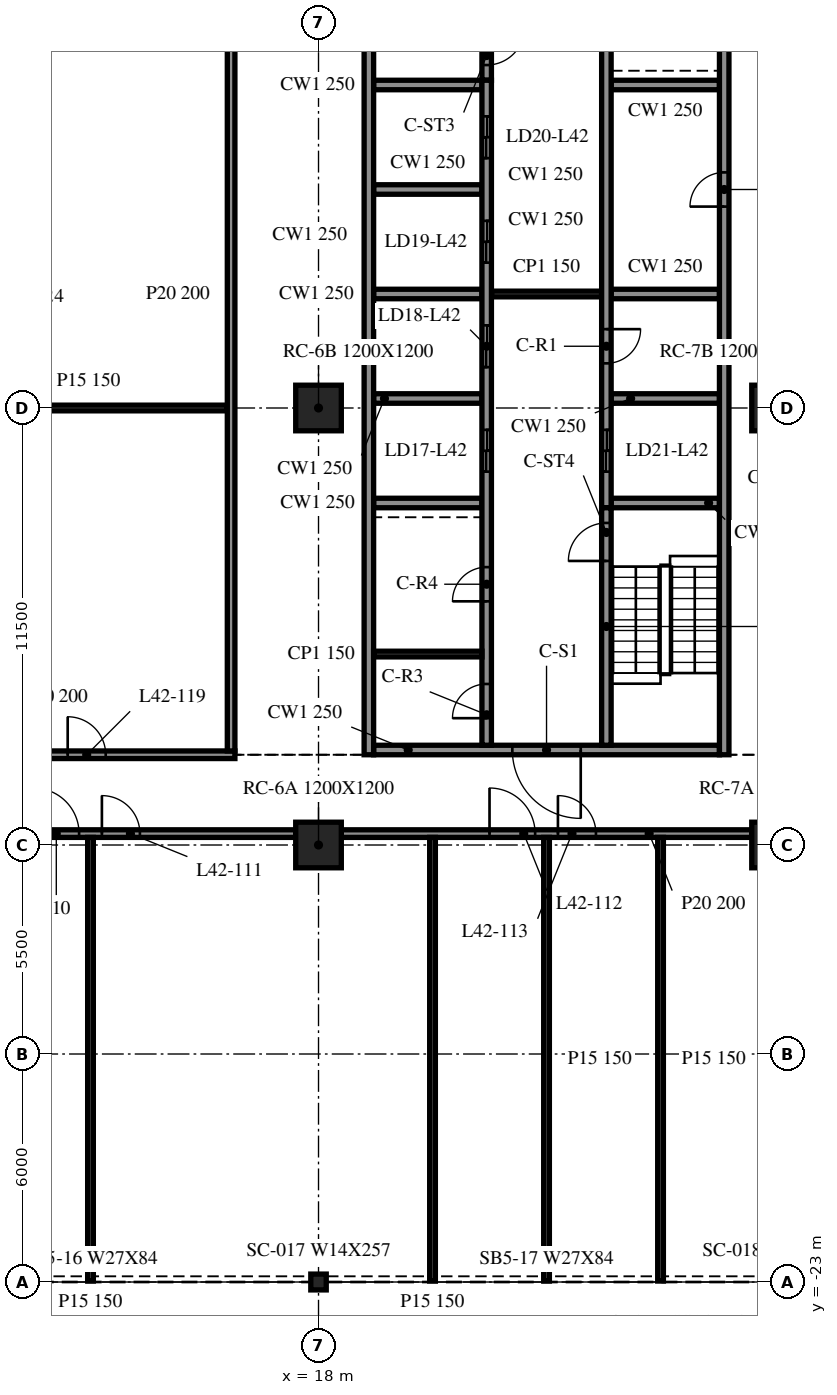
"""IFC4 building model, lengths in metres.
Left out: names, types, materials, properties, quantities, classifications, styles, units other than length and angle.
Written with IfcOpenShell. Run it as: python <this file> out.ifc"""

import sys

from ifc_helpers import new_model, si_unit, direction, frame, frame_2d, origin, origin_2d, place, context, subcontext, project, spatial, rectangle, i_section, extrude, element, fill, save


model = new_model("IFC4")
c1 = context("Model", 3, precision=1e-05, world=origin(), true_north=direction((0.0, 1.0)))
c2 = subcontext(c1, "Body", "Model", "MODEL_VIEW")
j1 = project(units=[si_unit("LENGTHUNIT", "METRE"), si_unit("PLANEANGLEUNIT", "RADIAN")], contexts=[c1])
p1 = place(None, origin())
s1 = spatial("IfcSite", under=j1, at=p1, CompositionType="ELEMENT")
p2 = place(p1, origin())
s2 = spatial("IfcBuilding", under=s1, at=p2, CompositionType="ELEMENT")
p3 = place(p2, frame((0.0, 0.0, 178.2)))
s3 = spatial("IfcBuildingStorey", under=s2, at=p3, CompositionType="ELEMENT", Elevation=178.2)
for number, where, z_axis, x_axis in (
    (1, (18.0, -11.5, -0.34), (0.0, 0.0, 1.0), (1.0, 0.0, 0.0)),
    (2, (18.0, 0.0, -0.34), (0.0, 0.0, 1.0), (1.0, 0.0, 0.0)),
    (3, (30.0, -11.5, -0.34), (0.0, 0.0, 1.0), (1.0, 0.0, 0.0)),
    (4, (30.0, 0.0, -0.34), (0.0, 0.0, 1.0), (1.0, 0.0, 0.0)),
):
    element("IfcColumn", number, at=place(p3, frame(where, z_axis=z_axis, x_axis=x_axis)), inside=s3, PredefinedType="COLUMN", context=c2, shape_type="SweptSolid", body=[
        extrude(rectangle(XDim=1.2, YDim=1.2, at=origin_2d()), origin(), (0.0, 0.0, 1.0), 3.8),
    ])
p4 = place(p3, frame((18.0, -23.0, -0.34), z_axis=(0.0, 0.0, 1.0), x_axis=(1.0, 0.0, 0.0)))
e5 = element("IfcColumn", 5, at=p4, inside=s3, PredefinedType="COLUMN", context=c2, shape_type="SweptSolid", body=[
    extrude(i_section(OverallWidth=0.406, OverallDepth=0.417, WebThickness=0.03, FlangeThickness=0.048, at=origin_2d()), origin(), (0.0, 0.0, 1.0), 3.8),
])
p5 = place(p3, frame((19.325, 15.125, 0.0), z_axis=(0.0, 0.0, 1.0), x_axis=(0.0, -1.0, 0.0)))
e6 = element("IfcWall", 6, at=p5, inside=s3, PredefinedType="SOLIDWALL", context=c2, shape_type="SweptSolid", body=[
    extrude(rectangle(XDim=24.25, YDim=0.25, at=frame_2d((12.125, 0.0))), origin(), (0.0, 0.0, 1.0), 3.46),
])
p6 = place(p3, frame((28.675, -9.125, 0.0), z_axis=(0.0, 0.0, 1.0), x_axis=(0.0, 1.0, 0.0)))
e7 = element("IfcWall", 7, at=p6, inside=s3, PredefinedType="SOLIDWALL", context=c2, shape_type="SweptSolid", body=[
    extrude(rectangle(XDim=24.25, YDim=0.25, at=frame_2d((12.125, 0.0))), origin(), (0.0, 0.0, 1.0), 3.46),
])
p7 = place(p6, frame((14.425, 0.0, 0.0)))
e8 = element("IfcOpeningElement", 8, at=p7, cuts=e7, PredefinedType="OPENING", context=c2, shape_type="SweptSolid", body=[
    extrude(rectangle(XDim=0.9, YDim=2.1, at=frame_2d((0.45, 1.05))), frame((0.0, 0.135, 0.0), z_axis=(0.0, -1.0, 0.0), x_axis=(1.0, 0.0, 0.0)), (0.0, 0.0, 1.0), 0.27),
])
p8 = place(p6, frame((19.012, 0.0, 0.0)))
e9 = element("IfcOpeningElement", 9, at=p8, cuts=e7, PredefinedType="OPENING", context=c2, shape_type="SweptSolid", body=[
    extrude(rectangle(XDim=0.9, YDim=2.1, at=frame_2d((0.45, 1.05))), frame((0.0, 0.135, 0.0), z_axis=(0.0, -1.0, 0.0), x_axis=(1.0, 0.0, 0.0)), (0.0, 0.0, 1.0), 0.27),
])
p9 = place(p6, frame((22.087, 0.0, 0.0)))
e10 = element("IfcOpeningElement", 10, at=p9, cuts=e7, PredefinedType="OPENING", context=c2, shape_type="SweptSolid", body=[
    extrude(rectangle(XDim=0.9, YDim=2.1, at=frame_2d((0.45, 1.05))), frame((0.0, 0.135, 0.0), z_axis=(0.0, -1.0, 0.0), x_axis=(1.0, 0.0, 0.0)), (0.0, 0.0, 1.0), 0.27),
])
p10 = place(p3, frame((28.55, -9.0, 0.0), z_axis=(0.0, 0.0, 1.0), x_axis=(-1.0, 0.0, 0.0)))
e11 = element("IfcWall", 11, at=p10, inside=s3, PredefinedType="SOLIDWALL", context=c2, shape_type="SweptSolid", body=[
    extrude(rectangle(XDim=9.1, YDim=0.25, at=frame_2d((4.55, 0.0))), origin(), (0.0, 0.0, 1.0), 3.46),
])
p11 = place(p10, frame((3.65, 0.0, 0.0)))
e12 = element("IfcOpeningElement", 12, at=p11, cuts=e11, PredefinedType="OPENING", context=c2, shape_type="SweptSolid", body=[
    extrude(rectangle(XDim=1.8, YDim=2.1, at=frame_2d((0.9, 1.05))), frame((0.0, 0.135, 0.0), z_axis=(0.0, -1.0, 0.0), x_axis=(1.0, 0.0, 0.0)), (0.0, 0.0, 1.0), 0.27),
])
p12 = place(p3, frame((22.425, -8.875, 0.0), z_axis=(0.0, 0.0, 1.0), x_axis=(0.0, 1.0, 0.0)))
e13 = element("IfcWall", 13, at=p12, inside=s3, PredefinedType="SOLIDWALL", context=c2, shape_type="SweptSolid", body=[
    extrude(rectangle(XDim=17.5, YDim=0.25, at=frame_2d((8.75, 0.0))), origin(), (0.0, 0.0, 1.0), 3.46),
])
p13 = place(p12, frame((7.2, 0.0, 0.0)))
e14 = element("IfcOpeningElement", 14, at=p13, cuts=e13, PredefinedType="OPENING", context=c2, shape_type="SweptSolid", body=[
    extrude(rectangle(XDim=1.1, YDim=2.1, at=frame_2d((0.55, 1.05))), frame((0.0, 0.135, 0.0), z_axis=(0.0, -1.0, 0.0), x_axis=(1.0, 0.0, 0.0)), (0.0, 0.0, 1.0), 0.27),
])
p14 = place(p12, frame((9.95, 0.0, 0.0)))
e15 = element("IfcOpeningElement", 15, at=p14, cuts=e13, PredefinedType="OPENING", context=c2, shape_type="SweptSolid", body=[
    extrude(rectangle(XDim=1.1, YDim=2.1, at=frame_2d((0.55, 1.05))), frame((0.0, 0.135, 0.0), z_axis=(0.0, -1.0, 0.0), x_axis=(1.0, 0.0, 0.0)), (0.0, 0.0, 1.0), 0.27),
])
p15 = place(p12, frame((12.7, 0.0, 0.0)))
e16 = element("IfcOpeningElement", 16, at=p15, cuts=e13, PredefinedType="OPENING", context=c2, shape_type="SweptSolid", body=[
    extrude(rectangle(XDim=1.1, YDim=2.1, at=frame_2d((0.55, 1.05))), frame((0.0, 0.135, 0.0), z_axis=(0.0, -1.0, 0.0), x_axis=(1.0, 0.0, 0.0)), (0.0, 0.0, 1.0), 0.27),
])
p16 = place(p12, frame((15.45, 0.0, 0.0)))
e17 = element("IfcOpeningElement", 17, at=p16, cuts=e13, PredefinedType="OPENING", context=c2, shape_type="SweptSolid", body=[
    extrude(rectangle(XDim=1.1, YDim=2.1, at=frame_2d((0.55, 1.05))), frame((0.0, 0.135, 0.0), z_axis=(0.0, -1.0, 0.0), x_axis=(1.0, 0.0, 0.0)), (0.0, 0.0, 1.0), 0.27),
])
p17 = place(p12, frame((0.712, 0.0, 0.0)))
e18 = element("IfcOpeningElement", 18, at=p17, cuts=e13, PredefinedType="OPENING", context=c2, shape_type="SweptSolid", body=[
    extrude(rectangle(XDim=0.9, YDim=2.1, at=frame_2d((0.45, 1.05))), frame((0.0, 0.135, 0.0), z_axis=(0.0, -1.0, 0.0), x_axis=(1.0, 0.0, 0.0)), (0.0, 0.0, 1.0), 0.27),
])
p18 = place(p12, frame((3.788, 0.0, 0.0)))
e19 = element("IfcOpeningElement", 19, at=p18, cuts=e13, PredefinedType="OPENING", context=c2, shape_type="SweptSolid", body=[
    extrude(rectangle(XDim=0.9, YDim=2.1, at=frame_2d((0.45, 1.05))), frame((0.0, 0.135, 0.0), z_axis=(0.0, -1.0, 0.0), x_axis=(1.0, 0.0, 0.0)), (0.0, 0.0, 1.0), 0.27),
])
p19 = place(p3, frame((22.425, 14.875, 0.0), z_axis=(0.0, 0.0, 1.0), x_axis=(0.0, -1.0, 0.0)))
e20 = element("IfcWall", 20, at=p19, inside=s3, PredefinedType="SOLIDWALL", context=c2, shape_type="SweptSolid", body=[
    extrude(rectangle(XDim=6.25, YDim=0.25, at=frame_2d((3.125, 0.0))), origin(), (0.0, 0.0, 1.0), 3.46),
])
p20 = place(p19, frame((4.85, 0.0, 0.0)))
e21 = element("IfcOpeningElement", 21, at=p20, cuts=e20, PredefinedType="OPENING", context=c2, shape_type="SweptSolid", body=[
    extrude(rectangle(XDim=1.0, YDim=2.1, at=frame_2d((0.5, 1.05))), frame((0.0, 0.135, 0.0), z_axis=(0.0, -1.0, 0.0), x_axis=(1.0, 0.0, 0.0)), (0.0, 0.0, 1.0), 0.27),
])
p21 = place(p3, frame((25.575, -8.875, 0.0), z_axis=(0.0, 0.0, 1.0), x_axis=(0.0, 1.0, 0.0)))
e22 = element("IfcWall", 22, at=p21, inside=s3, PredefinedType="SOLIDWALL", context=c2, shape_type="SweptSolid", body=[
    extrude(rectangle(XDim=6.25, YDim=0.25, at=frame_2d((3.125, 0.0))), origin(), (0.0, 0.0, 1.0), 3.46),
])
p22 = place(p21, frame((4.85, 0.0, 0.0)))
e23 = element("IfcOpeningElement", 23, at=p22, cuts=e22, PredefinedType="OPENING", context=c2, shape_type="SweptSolid", body=[
    extrude(rectangle(XDim=1.0, YDim=2.1, at=frame_2d((0.5, 1.05))), frame((0.0, 0.135, 0.0), z_axis=(0.0, -1.0, 0.0), x_axis=(1.0, 0.0, 0.0)), (0.0, 0.0, 1.0), 0.27),
])
p23 = place(p3, frame((25.575, 14.875, 0.0), z_axis=(0.0, 0.0, 1.0), x_axis=(0.0, -1.0, 0.0)))
e24 = element("IfcWall", 24, at=p23, inside=s3, PredefinedType="SOLIDWALL", context=c2, shape_type="SweptSolid", body=[
    extrude(rectangle(XDim=17.5, YDim=0.25, at=frame_2d((8.75, 0.0))), origin(), (0.0, 0.0, 1.0), 3.46),
])
p24 = place(p23, frame((15.45, 0.0, 0.0)))
e25 = element("IfcOpeningElement", 25, at=p24, cuts=e24, PredefinedType="OPENING", context=c2, shape_type="SweptSolid", body=[
    extrude(rectangle(XDim=1.1, YDim=2.1, at=frame_2d((0.55, 1.05))), frame((0.0, 0.135, 0.0), z_axis=(0.0, -1.0, 0.0), x_axis=(1.0, 0.0, 0.0)), (0.0, 0.0, 1.0), 0.27),
])
p25 = place(p23, frame((12.8, 0.0, 0.0)))
e26 = element("IfcOpeningElement", 26, at=p25, cuts=e24, PredefinedType="OPENING", context=c2, shape_type="SweptSolid", body=[
    extrude(rectangle(XDim=0.9, YDim=2.1, at=frame_2d((0.45, 1.05))), frame((0.0, 0.135, 0.0), z_axis=(0.0, -1.0, 0.0), x_axis=(1.0, 0.0, 0.0)), (0.0, 0.0, 1.0), 0.27),
])
for number, where, z_axis, x_axis in (
    (27, (19.45, -2.5, 0.0), (0.0, 0.0, 1.0), (1.0, 0.0, 0.0)),
    (28, (19.45, 0.25, 0.0), (0.0, 0.0, 1.0), (1.0, 0.0, 0.0)),
    (29, (19.45, 3.0, 0.0), (0.0, 0.0, 1.0), (1.0, 0.0, 0.0)),
    (30, (19.45, 5.75, 0.0), (0.0, 0.0, 1.0), (1.0, 0.0, 0.0)),
    (31, (19.45, 8.5, 0.0), (0.0, 0.0, 1.0), (1.0, 0.0, 0.0)),
    (32, (25.7, -2.5, 0.0), (0.0, 0.0, 1.0), (1.0, 0.0, 0.0)),
    (33, (25.7, 0.25, 0.0), (0.0, 0.0, 1.0), (1.0, 0.0, 0.0)),
    (34, (25.7, 3.0, 0.0), (0.0, 0.0, 1.0), (1.0, 0.0, 0.0)),
    (35, (25.7, 8.5, 0.0), (0.0, 0.0, 1.0), (1.0, 0.0, 0.0)),
):
    element("IfcWall", number, at=place(p3, frame(where, z_axis=z_axis, x_axis=x_axis)), inside=s3, PredefinedType="SOLIDWALL", context=c2, shape_type="SweptSolid", body=[
        extrude(rectangle(XDim=2.85, YDim=0.25, at=frame_2d((1.425, 0.0))), origin(), (0.0, 0.0, 1.0), 3.46),
    ])
p26 = place(p3, frame((22.55, 3.0, 0.0), z_axis=(0.0, 0.0, 1.0), x_axis=(1.0, 0.0, 0.0)))
e36 = element("IfcWall", 36, at=p26, inside=s3, PredefinedType="PARTITIONING", context=c2, shape_type="SweptSolid", body=[
    extrude(rectangle(XDim=2.9, YDim=0.15, at=frame_2d((1.45, 0.0))), origin(), (0.0, 0.0, 1.0), 3.46),
])
p27 = place(p3, frame((19.45, -6.475, 0.0), z_axis=(0.0, 0.0, 1.0), x_axis=(1.0, 0.0, 0.0)))
e37 = element("IfcWall", 37, at=p27, inside=s3, PredefinedType="PARTITIONING", context=c2, shape_type="SweptSolid", body=[
    extrude(rectangle(XDim=2.85, YDim=0.15, at=frame_2d((1.425, 0.0))), origin(), (0.0, 0.0, 1.0), 3.46),
])
p28 = place(p3, frame((6.6, -11.2, 0.0), z_axis=(0.0, 0.0, 1.0), x_axis=(1.0, 0.0, 0.0)))
e38 = element("IfcWall", 38, at=p28, inside=s3, PredefinedType="PARTITIONING", context=c2, shape_type="SweptSolid", body=[
    extrude(rectangle(XDim=10.8, YDim=0.2, at=frame_2d((5.4, 0.0))), origin(), (0.0, 0.0, 1.0), 3.46),
])
p29 = place(p28, frame((3.9, 0.0, 0.0)))
e39 = element("IfcOpeningElement", 39, at=p29, cuts=e38, PredefinedType="OPENING", context=c2, shape_type="SweptSolid", body=[
    extrude(rectangle(XDim=1.2, YDim=2.1, at=frame_2d((0.6, 1.05))), frame((0.0, 0.11, 0.0), z_axis=(0.0, -1.0, 0.0), x_axis=(1.0, 0.0, 0.0)), (0.0, 0.0, 1.0), 0.22),
])
p30 = place(p28, frame((5.7, 0.0, 0.0)))
e40 = element("IfcOpeningElement", 40, at=p30, cuts=e38, PredefinedType="OPENING", context=c2, shape_type="SweptSolid", body=[
    extrude(rectangle(XDim=1.0, YDim=2.1, at=frame_2d((0.5, 1.05))), frame((0.0, 0.11, 0.0), z_axis=(0.0, -1.0, 0.0), x_axis=(1.0, 0.0, 0.0)), (0.0, 0.0, 1.0), 0.22),
])
p31 = place(p3, frame((18.6, -11.2, 0.0), z_axis=(0.0, 0.0, 1.0), x_axis=(1.0, 0.0, 0.0)))
e41 = element("IfcWall", 41, at=p31, inside=s3, PredefinedType="PARTITIONING", context=c2, shape_type="SweptSolid", body=[
    extrude(rectangle(XDim=10.8, YDim=0.2, at=frame_2d((5.4, 0.0))), origin(), (0.0, 0.0, 1.0), 3.46),
])
p32 = place(p31, frame((3.9, 0.0, 0.0)))
e42 = element("IfcOpeningElement", 42, at=p32, cuts=e41, PredefinedType="OPENING", context=c2, shape_type="SweptSolid", body=[
    extrude(rectangle(XDim=1.2, YDim=2.1, at=frame_2d((0.6, 1.05))), frame((0.0, 0.11, 0.0), z_axis=(0.0, -1.0, 0.0), x_axis=(1.0, 0.0, 0.0)), (0.0, 0.0, 1.0), 0.22),
])
p33 = place(p31, frame((5.7, 0.0, 0.0)))
e43 = element("IfcOpeningElement", 43, at=p33, cuts=e41, PredefinedType="OPENING", context=c2, shape_type="SweptSolid", body=[
    extrude(rectangle(XDim=1.0, YDim=2.1, at=frame_2d((0.5, 1.05))), frame((0.0, 0.11, 0.0), z_axis=(0.0, -1.0, 0.0), x_axis=(1.0, 0.0, 0.0)), (0.0, 0.0, 1.0), 0.22),
])
p34 = place(p3, frame((8.1, -9.125, 0.0), z_axis=(0.0, 0.0, 1.0), x_axis=(1.0, 0.0, 0.0)))
e44 = element("IfcWall", 44, at=p34, inside=s3, PredefinedType="PARTITIONING", context=c2, shape_type="SweptSolid", body=[
    extrude(rectangle(XDim=7.7, YDim=0.2, at=frame_2d((3.85, 0.0))), origin(), (0.0, 0.0, 1.0), 3.46),
])
p35 = place(p34, frame((3.3, 0.0, 0.0)))
e45 = element("IfcOpeningElement", 45, at=p35, cuts=e44, PredefinedType="OPENING", context=c2, shape_type="SweptSolid", body=[
    extrude(rectangle(XDim=1.0, YDim=2.1, at=frame_2d((0.5, 1.05))), frame((0.0, 0.11, 0.0), z_axis=(0.0, -1.0, 0.0), x_axis=(1.0, 0.0, 0.0)), (0.0, 0.0, 1.0), 0.22),
])
p36 = place(p3, frame((8.3, 0.0, 0.0), z_axis=(0.0, 0.0, 1.0), x_axis=(1.0, 0.0, 0.0)))
e46 = element("IfcWall", 46, at=p36, inside=s3, PredefinedType="PARTITIONING", context=c2, shape_type="SweptSolid", body=[
    extrude(rectangle(XDim=7.3, YDim=0.15, at=frame_2d((3.65, 0.0))), origin(), (0.0, 0.0, 1.0), 3.46),
])
p37 = place(p3, frame((12.0, -22.975, 0.0), z_axis=(0.0, 0.0, 1.0), x_axis=(0.0, 1.0, 0.0)))
e47 = element("IfcWall", 47, at=p37, inside=s3, PredefinedType="PARTITIONING", context=c2, shape_type="SweptSolid", body=[
    extrude(rectangle(XDim=11.675, YDim=0.15, at=frame_2d((5.837, 0.0))), origin(), (0.0, 0.0, 1.0), 3.46),
])
p38 = place(p3, frame((15.7, -9.025, 0.0), z_axis=(0.0, 0.0, 1.0), x_axis=(0.0, 1.0, 0.0)))
e48 = element("IfcWall", 48, at=p38, inside=s3, PredefinedType="PARTITIONING", context=c2, shape_type="SweptSolid", body=[
    extrude(rectangle(XDim=24.05, YDim=0.2, at=frame_2d((12.025, 0.0))), origin(), (0.0, 0.0, 1.0), 3.46),
])
for number, where, z_axis, x_axis in (
    (49, (21.0, -22.975, 0.0), (0.0, 0.0, 1.0), (0.0, 1.0, 0.0)),
    (50, (24.0, -22.975, 0.0), (0.0, 0.0, 1.0), (0.0, 1.0, 0.0)),
    (51, (27.0, -22.975, 0.0), (0.0, 0.0, 1.0), (0.0, 1.0, 0.0)),
):
    element("IfcWall", number, at=place(p3, frame(where, z_axis=z_axis, x_axis=x_axis)), inside=s3, PredefinedType="PARTITIONING", context=c2, shape_type="SweptSolid", body=[
        extrude(rectangle(XDim=11.675, YDim=0.15, at=frame_2d((5.837, 0.0))), origin(), (0.0, 0.0, 1.0), 3.46),
    ])
p39 = place(p11, origin())
e52 = element("IfcDoor", 52, at=p39, inside=s3, OperationType="DOUBLE_DOOR_SINGLE_SWING", PredefinedType="DOOR", context=c2, shape_type="SweptSolid", body=[
    extrude(rectangle(XDim=1.8, YDim=2.1, at=frame_2d((0.9, 1.05))), frame((0.0, 0.025, 0.0), z_axis=(0.0, -1.0, 0.0), x_axis=(1.0, 0.0, 0.0)), (0.0, 0.0, 1.0), 0.05),
])
fill(e12, e52)
p40 = place(p24, origin())
e53 = element("IfcDoor", 53, at=p40, inside=s3, OperationType="DOUBLE_DOOR_SLIDING", PredefinedType="DOOR", context=c2, shape_type="SweptSolid", body=[
    extrude(rectangle(XDim=1.1, YDim=2.1, at=frame_2d((0.55, 1.05))), frame((0.0, 0.025, 0.0), z_axis=(0.0, -1.0, 0.0), x_axis=(1.0, 0.0, 0.0)), (0.0, 0.0, 1.0), 0.05),
])
fill(e25, e53)
p41 = place(p13, origin())
e54 = element("IfcDoor", 54, at=p41, inside=s3, OperationType="DOUBLE_DOOR_SLIDING", PredefinedType="DOOR", context=c2, shape_type="SweptSolid", body=[
    extrude(rectangle(XDim=1.1, YDim=2.1, at=frame_2d((0.55, 1.05))), frame((0.0, 0.025, 0.0), z_axis=(0.0, -1.0, 0.0), x_axis=(1.0, 0.0, 0.0)), (0.0, 0.0, 1.0), 0.05),
])
fill(e14, e54)
p42 = place(p14, origin())
e55 = element("IfcDoor", 55, at=p42, inside=s3, OperationType="DOUBLE_DOOR_SLIDING", PredefinedType="DOOR", context=c2, shape_type="SweptSolid", body=[
    extrude(rectangle(XDim=1.1, YDim=2.1, at=frame_2d((0.55, 1.05))), frame((0.0, 0.025, 0.0), z_axis=(0.0, -1.0, 0.0), x_axis=(1.0, 0.0, 0.0)), (0.0, 0.0, 1.0), 0.05),
])
fill(e15, e55)
p43 = place(p15, origin())
e56 = element("IfcDoor", 56, at=p43, inside=s3, OperationType="DOUBLE_DOOR_SLIDING", PredefinedType="DOOR", context=c2, shape_type="SweptSolid", body=[
    extrude(rectangle(XDim=1.1, YDim=2.1, at=frame_2d((0.55, 1.05))), frame((0.0, 0.025, 0.0), z_axis=(0.0, -1.0, 0.0), x_axis=(1.0, 0.0, 0.0)), (0.0, 0.0, 1.0), 0.05),
])
fill(e16, e56)
p44 = place(p16, origin())
e57 = element("IfcDoor", 57, at=p44, inside=s3, OperationType="DOUBLE_DOOR_SLIDING", PredefinedType="DOOR", context=c2, shape_type="SweptSolid", body=[
    extrude(rectangle(XDim=1.1, YDim=2.1, at=frame_2d((0.55, 1.05))), frame((0.0, 0.025, 0.0), z_axis=(0.0, -1.0, 0.0), x_axis=(1.0, 0.0, 0.0)), (0.0, 0.0, 1.0), 0.05),
])
fill(e17, e57)
p45 = place(p25, origin())
e58 = element("IfcDoor", 58, at=p45, inside=s3, OperationType="SINGLE_SWING_LEFT", PredefinedType="DOOR", context=c2, shape_type="SweptSolid", body=[
    extrude(rectangle(XDim=0.9, YDim=2.1, at=frame_2d((0.45, 1.05))), frame((0.0, 0.025, 0.0), z_axis=(0.0, -1.0, 0.0), x_axis=(1.0, 0.0, 0.0)), (0.0, 0.0, 1.0), 0.05),
])
fill(e26, e58)
p46 = place(p7, origin())
e59 = element("IfcDoor", 59, at=p46, inside=s3, OperationType="SINGLE_SWING_RIGHT", PredefinedType="DOOR", context=c2, shape_type="SweptSolid", body=[
    extrude(rectangle(XDim=0.9, YDim=2.1, at=frame_2d((0.45, 1.05))), frame((0.0, 0.025, 0.0), z_axis=(0.0, -1.0, 0.0), x_axis=(1.0, 0.0, 0.0)), (0.0, 0.0, 1.0), 0.05),
])
fill(e8, e59)
p47 = place(p17, origin())
e60 = element("IfcDoor", 60, at=p47, inside=s3, OperationType="SINGLE_SWING_LEFT", PredefinedType="DOOR", context=c2, shape_type="SweptSolid", body=[
    extrude(rectangle(XDim=0.9, YDim=2.1, at=frame_2d((0.45, 1.05))), frame((0.0, 0.025, 0.0), z_axis=(0.0, -1.0, 0.0), x_axis=(1.0, 0.0, 0.0)), (0.0, 0.0, 1.0), 0.05),
])
fill(e18, e60)
p48 = place(p18, origin())
e61 = element("IfcDoor", 61, at=p48, inside=s3, OperationType="SINGLE_SWING_RIGHT", PredefinedType="DOOR", context=c2, shape_type="SweptSolid", body=[
    extrude(rectangle(XDim=0.9, YDim=2.1, at=frame_2d((0.45, 1.05))), frame((0.0, 0.025, 0.0), z_axis=(0.0, -1.0, 0.0), x_axis=(1.0, 0.0, 0.0)), (0.0, 0.0, 1.0), 0.05),
])
fill(e19, e61)
p49 = place(p20, origin())
e62 = element("IfcDoor", 62, at=p49, inside=s3, OperationType="SINGLE_SWING_LEFT", PredefinedType="DOOR", context=c2, shape_type="SweptSolid", body=[
    extrude(rectangle(XDim=1.0, YDim=2.1, at=frame_2d((0.5, 1.05))), frame((0.0, 0.025, 0.0), z_axis=(0.0, -1.0, 0.0), x_axis=(1.0, 0.0, 0.0)), (0.0, 0.0, 1.0), 0.05),
])
fill(e21, e62)
p50 = place(p22, origin())
e63 = element("IfcDoor", 63, at=p50, inside=s3, OperationType="SINGLE_SWING_RIGHT", PredefinedType="DOOR", context=c2, shape_type="SweptSolid", body=[
    extrude(rectangle(XDim=1.0, YDim=2.1, at=frame_2d((0.5, 1.05))), frame((0.0, 0.025, 0.0), z_axis=(0.0, -1.0, 0.0), x_axis=(1.0, 0.0, 0.0)), (0.0, 0.0, 1.0), 0.05),
])
fill(e23, e63)
p51 = place(p29, origin())
e64 = element("IfcDoor", 64, at=p51, inside=s3, OperationType="SINGLE_SWING_RIGHT", PredefinedType="DOOR", context=c2, shape_type="SweptSolid", body=[
    extrude(rectangle(XDim=1.2, YDim=2.1, at=frame_2d((0.6, 1.05))), frame((0.0, 0.025, 0.0), z_axis=(0.0, -1.0, 0.0), x_axis=(1.0, 0.0, 0.0)), (0.0, 0.0, 1.0), 0.05),
])
fill(e39, e64)
p52 = place(p30, origin())
e65 = element("IfcDoor", 65, at=p52, inside=s3, OperationType="SINGLE_SWING_LEFT", PredefinedType="DOOR", context=c2, shape_type="SweptSolid", body=[
    extrude(rectangle(XDim=1.0, YDim=2.1, at=frame_2d((0.5, 1.05))), frame((0.0, 0.025, 0.0), z_axis=(0.0, -1.0, 0.0), x_axis=(1.0, 0.0, 0.0)), (0.0, 0.0, 1.0), 0.05),
])
fill(e40, e65)
p53 = place(p32, origin())
e66 = element("IfcDoor", 66, at=p53, inside=s3, OperationType="SINGLE_SWING_RIGHT", PredefinedType="DOOR", context=c2, shape_type="SweptSolid", body=[
    extrude(rectangle(XDim=1.2, YDim=2.1, at=frame_2d((0.6, 1.05))), frame((0.0, 0.025, 0.0), z_axis=(0.0, -1.0, 0.0), x_axis=(1.0, 0.0, 0.0)), (0.0, 0.0, 1.0), 0.05),
])
fill(e42, e66)
p54 = place(p33, origin())
e67 = element("IfcDoor", 67, at=p54, inside=s3, OperationType="SINGLE_SWING_LEFT", PredefinedType="DOOR", context=c2, shape_type="SweptSolid", body=[
    extrude(rectangle(XDim=1.0, YDim=2.1, at=frame_2d((0.5, 1.05))), frame((0.0, 0.025, 0.0), z_axis=(0.0, -1.0, 0.0), x_axis=(1.0, 0.0, 0.0)), (0.0, 0.0, 1.0), 0.05),
])
fill(e43, e67)
p55 = place(p35, origin())
e68 = element("IfcDoor", 68, at=p55, inside=s3, OperationType="SINGLE_SWING_LEFT", PredefinedType="DOOR", context=c2, shape_type="SweptSolid", body=[
    extrude(rectangle(XDim=1.0, YDim=2.1, at=frame_2d((0.5, 1.05))), frame((0.0, 0.025, 0.0), z_axis=(0.0, -1.0, 0.0), x_axis=(1.0, 0.0, 0.0)), (0.0, 0.0, 1.0), 0.05),
])
fill(e45, e68)
save(model, sys.argv[1])
